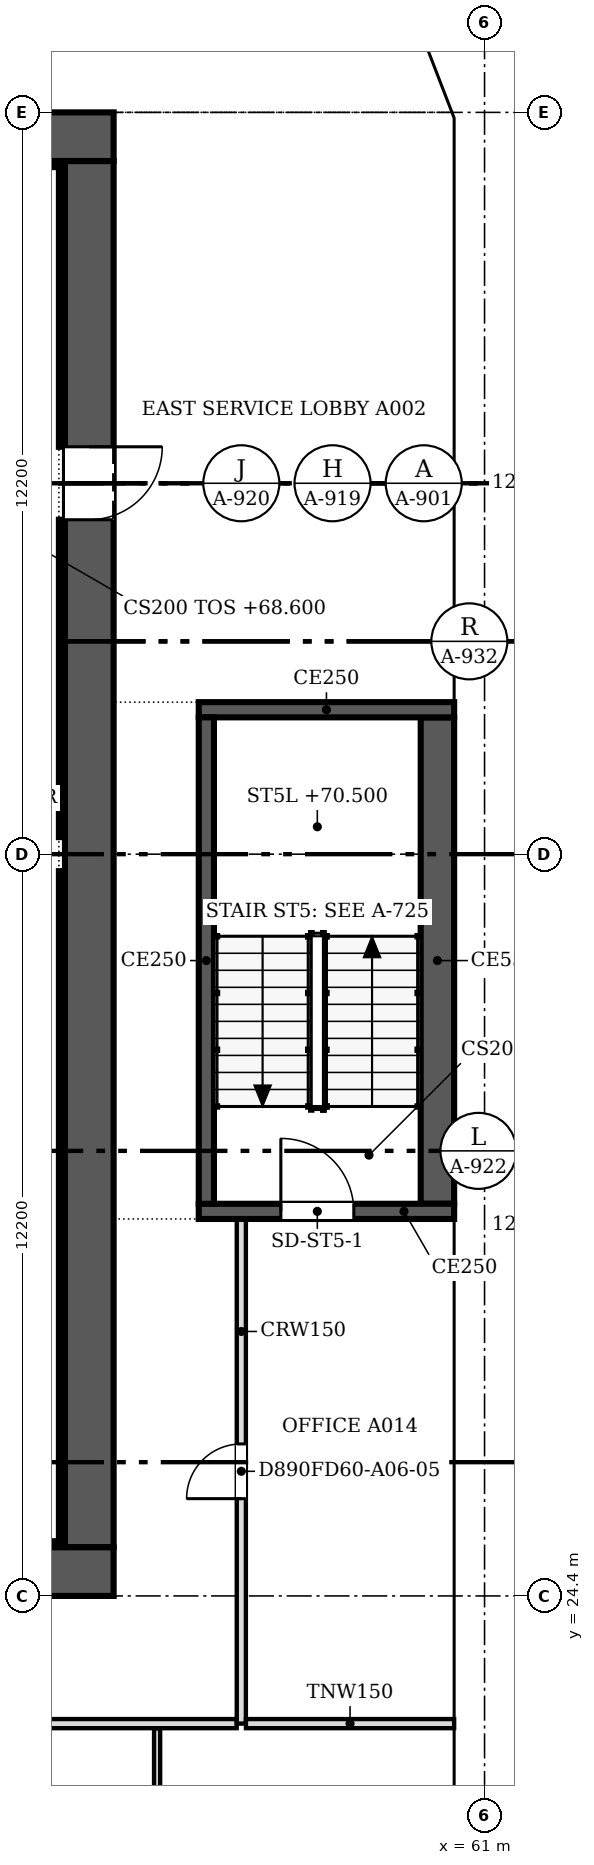
"""IFC4 building model, lengths in metres.
Left out: names, types, materials, properties, quantities, classifications, styles, units other than length and angle.
Written with IfcOpenShell. Run it as: python <this file> out.ifc"""

import sys

from ifc_helpers import new_model, si_unit, direction, frame, frame_2d, origin, place, context, subcontext, project, spatial, polyline, rectangle, outline, extrude, faceted_brep, source, transform, mapped, element, fill, save


model = new_model("IFC4")
c1 = context("Model", 3, precision=1e-05, world=origin(), true_north=direction((0.0, 1.0)))
c2 = subcontext(c1, "Body", "Model", "MODEL_VIEW")
j1 = project(units=[si_unit("LENGTHUNIT", "METRE"), si_unit("PLANEANGLEUNIT", "RADIAN")], contexts=[c1])
p1 = place(None, origin())
s1 = spatial("IfcSite", under=j1, at=p1, CompositionType="ELEMENT")
p2 = place(p1, origin())
s2 = spatial("IfcBuilding", under=s1, at=p2, CompositionType="ELEMENT")
p3 = place(p2, frame((0.0, 0.0, 68.6)))
s3 = spatial("IfcBuildingStorey", under=s2, at=p3, CompositionType="ELEMENT", Elevation=68.6)
m1 = source(origin(), c2, "Body", "Brep", [
    faceted_brep([(6.1, -0.25, 0.0), (3.05, -0.25, 3.8), (0.0, -0.25, 0.0), (6.1, -0.25, 0.0), (0.0, 0.25, 0.0), (3.05, 0.25, 3.8), (6.1, 0.25, 0.0), (6.1, 0.25, 0.0)], [[[0, 1, 2, 3]], [[4, 5, 6, 7]], [[6, 5, 1, 0]], [[5, 4, 2, 1]], [[4, 7, 3, 2]], [[3, 7, 6, 0]]]),
])
p4 = place(p3, frame((60.75, 18.3, 0.0), z_axis=(0.0, 0.0, 1.0), x_axis=(0.0, 1.0, 0.0)))
e1 = element("IfcWall", 1, at=p4, inside=s3, PredefinedType="SOLIDWALL", context=c2, shape_type="MappedRepresentation", body=[
    mapped(m1, transform((0.0, 0.0, 0.0), scale=1.0)),
])
m2 = source(origin(), c2, "Body", "SweptSolid", [
    extrude(outline(polyline([(5.579, 0.25), (3.05, 3.4), (0.521, 0.25), (5.579, 0.25)])), frame((0.0, 0.26, 0.0), z_axis=(0.0, -1.0, 0.0), x_axis=(1.0, 0.0, 0.0)), (0.0, 0.0, 1.0), 0.52),
])
p5 = place(p4, origin())
e2 = element("IfcOpeningElement", 2, at=p5, cuts=e1, PredefinedType="OPENING", context=c2, shape_type="MappedRepresentation", body=[
    mapped(m2, transform((0.0, 0.0, 0.0), scale=1.0)),
])
m3 = source(origin(), c2, "Body", "SweptSolid", [
    extrude(outline(polyline([(6.1, 0.0), (3.05, 3.8), (0.0, 0.0), (6.1, 0.0)])), frame((0.0, 0.25, 0.0), z_axis=(0.0, -1.0, 0.0), x_axis=(1.0, 0.0, 0.0)), (0.0, 0.0, 1.0), 0.5),
])
p6 = place(p3, frame((60.75, 24.4, 0.0), z_axis=(0.0, 0.0, 1.0), x_axis=(0.0, 1.0, 0.0)))
e3 = element("IfcWall", 3, at=p6, inside=s3, PredefinedType="SOLIDWALL", context=c2, shape_type="MappedRepresentation", body=[
    mapped(m3, transform((0.0, 0.0, 0.0), scale=1.0)),
])
p7 = place(p6, origin())
e4 = element("IfcOpeningElement", 4, at=p7, cuts=e3, PredefinedType="OPENING", context=c2, shape_type="MappedRepresentation", body=[
    mapped(m2, transform((0.0, 0.0, 0.0), scale=1.0)),
])
p8 = place(p3, frame((60.75, 30.5, 0.0), z_axis=(0.0, 0.0, 1.0), x_axis=(0.0, 1.0, 0.0)))
e5 = element("IfcWall", 5, at=p8, inside=s3, PredefinedType="SOLIDWALL", context=c2, shape_type="MappedRepresentation", body=[
    mapped(m3, transform((0.0, 0.0, 0.0), scale=1.0)),
])
p9 = place(p8, origin())
e6 = element("IfcOpeningElement", 6, at=p9, cuts=e5, PredefinedType="OPENING", context=c2, shape_type="MappedRepresentation", body=[
    mapped(m2, transform((0.0, 0.0, 0.0), scale=1.0)),
])
p10 = place(p3, frame((60.75, 36.6, 0.0), z_axis=(0.0, 0.0, 1.0), x_axis=(0.0, 1.0, 0.0)))
e7 = element("IfcWall", 7, at=p10, inside=s3, PredefinedType="SOLIDWALL", context=c2, shape_type="MappedRepresentation", body=[
    mapped(m1, transform((0.0, 0.0, 0.0), scale=1.0)),
])
p11 = place(p10, origin())
e8 = element("IfcOpeningElement", 8, at=p11, cuts=e7, PredefinedType="OPENING", context=c2, shape_type="MappedRepresentation", body=[
    mapped(m2, transform((0.0, 0.0, 0.0), scale=1.0)),
])
m4 = source(origin(), c2, "Body", "Brep", [
    faceted_brep([(6.053, -0.25, 0.0), (3.05, -0.25, 3.8), (0.0, -0.25, 0.0), (0.0, 0.25, 0.0), (3.05, 0.25, 3.8), (6.007, 0.25, 0.059), (6.007, 0.25, 0.0), (6.053, 0.0, 0.0)], [[[0, 1, 2]], [[3, 4, 5, 6]], [[5, 4, 1, 0, 7]], [[4, 3, 2, 1]], [[3, 6, 7, 0, 2]], [[7, 6, 5]]]),
])
p12 = place(p3, frame((60.75, 42.7, 0.0), z_axis=(0.0, 0.0, 1.0), x_axis=(0.0, 1.0, 0.0)))
e9 = element("IfcWall", 9, at=p12, inside=s3, PredefinedType="SOLIDWALL", context=c2, shape_type="MappedRepresentation", body=[
    mapped(m4, transform((0.0, 0.0, 0.0), scale=1.0)),
])
m5 = source(origin(), c2, "Body", "SweptSolid", [
    extrude(outline(polyline([(5.537, 0.25), (3.049, 3.399), (0.521, 0.25), (5.537, 0.25)])), frame((0.0, 0.26, 0.0), z_axis=(0.0, -1.0, 0.0), x_axis=(1.0, 0.0, 0.0)), (0.0, 0.0, 1.0), 0.52),
])
p13 = place(p12, origin())
e10 = element("IfcOpeningElement", 10, at=p13, cuts=e9, PredefinedType="OPENING", context=c2, shape_type="MappedRepresentation", body=[
    mapped(m5, transform((0.0, 0.0, 0.0), scale=1.0)),
])
m6 = source(origin(), c2, "Body", "Brep", [
    faceted_brep([(3.003, -0.25, 3.731), (2.95, -0.25, 3.8), (0.0, -0.25, 0.0), (3.003, -0.25, 0.0), (0.047, 0.25, 0.06), (2.898, 0.25, 3.732), (2.898, 0.25, 0.0), (0.047, 0.25, 0.0), (2.95, 0.0, 3.8), (0.0, 0.0, 0.0)], [[[0, 1, 2, 3]], [[4, 5, 6, 7]], [[8, 1, 0]], [[5, 4, 9, 2, 1, 8]], [[7, 6, 3, 2, 9]], [[7, 9, 4]], [[3, 6, 5, 8, 0]]]),
])
p14 = place(p3, frame((60.75, 48.753, 0.0), z_axis=(0.0, 0.0, 1.0), x_axis=(-0.35992665181, 0.932980602862, 0.0)))
e11 = element("IfcWall", 11, at=p14, inside=s3, PredefinedType="SOLIDWALL", context=c2, shape_type="MappedRepresentation", body=[
    mapped(m6, transform((0.0, 0.0, 0.0), scale=1.0)),
])
m7 = source(origin(), c2, "Body", "SweptSolid", [
    extrude(outline(polyline([(2.75, 3.135), (0.511, 0.25), (2.75, 0.25), (2.75, 3.135)])), frame((0.0, 0.26, 0.0), z_axis=(0.0, -1.0, 0.0), x_axis=(1.0, 0.0, 0.0)), (0.0, 0.0, 1.0), 0.52),
])
p15 = place(p14, origin())
e12 = element("IfcOpeningElement", 12, at=p15, cuts=e11, PredefinedType="OPENING", context=c2, shape_type="MappedRepresentation", body=[
    mapped(m7, transform((0.0, 0.0, 0.0), scale=1.0)),
])
p16 = place(p2, frame((0.0, 0.0, 72.4)))
s4 = spatial("IfcBuildingStorey", under=s2, at=p16, CompositionType="ELEMENT", Elevation=72.4)
m8 = source(origin(), c2, "Body", "SweptSolid", [
    extrude(outline(polyline([(3.05, 0.0), (6.1, 3.8), (3.05, 7.6), (0.0, 3.8), (3.05, 0.0)])), frame((0.0, 0.25, 0.0), z_axis=(0.0, -1.0, 0.0), x_axis=(1.0, 0.0, 0.0)), (0.0, 0.0, 1.0), 0.5),
])
p17 = place(p16, frame((60.75, 15.25, -3.8), z_axis=(0.0, 0.0, 1.0), x_axis=(0.0, 1.0, 0.0)))
e13 = element("IfcWall", 13, at=p17, inside=s4, PredefinedType="SOLIDWALL", context=c2, shape_type="MappedRepresentation", body=[
    mapped(m8, transform((0.0, 0.0, 0.0), scale=1.0)),
])
m9 = source(origin(), c2, "Body", "SweptSolid", [
    extrude(outline(polyline([(3.05, 0.399), (5.78, 3.8), (3.05, 7.2), (0.321, 3.8), (3.05, 0.399)])), frame((0.0, 0.26, 0.0), z_axis=(0.0, -1.0, 0.0), x_axis=(1.0, 0.0, 0.0)), (0.0, 0.0, 1.0), 0.52),
])
p18 = place(p17, origin())
e14 = element("IfcOpeningElement", 14, at=p18, cuts=e13, PredefinedType="OPENING", context=c2, shape_type="MappedRepresentation", body=[
    mapped(m9, transform((0.0, 0.0, 0.0), scale=1.0)),
])
m10 = source(origin(), c2, "Body", "Brep", [
    faceted_brep([(3.05, -0.25, 0.0), (6.1, -0.25, 3.8), (6.1, -0.25, 3.8), (3.05, -0.25, 7.6), (0.0, -0.25, 3.8), (0.0, 0.25, 3.8), (3.05, 0.25, 7.6), (6.1, 0.25, 3.8), (6.1, 0.25, 3.8), (3.05, 0.25, 0.0)], [[[0, 1, 2, 3, 4]], [[5, 6, 7, 8, 9]], [[9, 8, 1, 0]], [[7, 6, 3, 2]], [[6, 5, 4, 3]], [[5, 9, 0, 4]], [[1, 8, 7, 2]]]),
])
p19 = place(p16, frame((60.75, 21.35, -3.8), z_axis=(0.0, 0.0, 1.0), x_axis=(0.0, 1.0, 0.0)))
e15 = element("IfcWall", 15, at=p19, inside=s4, PredefinedType="SOLIDWALL", context=c2, shape_type="MappedRepresentation", body=[
    mapped(m10, transform((0.0, 0.0, 0.0), scale=1.0)),
])
p20 = place(p19, origin())
e16 = element("IfcOpeningElement", 16, at=p20, cuts=e15, PredefinedType="OPENING", context=c2, shape_type="MappedRepresentation", body=[
    mapped(m9, transform((0.0, 0.0, 0.0), scale=1.0)),
])
p21 = place(p16, frame((60.75, 27.45, -3.8), z_axis=(0.0, 0.0, 1.0), x_axis=(0.0, 1.0, 0.0)))
e17 = element("IfcWall", 17, at=p21, inside=s4, PredefinedType="SOLIDWALL", context=c2, shape_type="MappedRepresentation", body=[
    mapped(m8, transform((0.0, 0.0, 0.0), scale=1.0)),
])
p22 = place(p21, origin())
e18 = element("IfcOpeningElement", 18, at=p22, cuts=e17, PredefinedType="OPENING", context=c2, shape_type="MappedRepresentation", body=[
    mapped(m9, transform((0.0, 0.0, 0.0), scale=1.0)),
])
p23 = place(p16, frame((60.75, 33.55, -3.8), z_axis=(0.0, 0.0, 1.0), x_axis=(0.0, 1.0, 0.0)))
e19 = element("IfcWall", 19, at=p23, inside=s4, PredefinedType="SOLIDWALL", context=c2, shape_type="MappedRepresentation", body=[
    mapped(m10, transform((0.0, 0.0, 0.0), scale=1.0)),
])
p24 = place(p23, origin())
e20 = element("IfcOpeningElement", 20, at=p24, cuts=e19, PredefinedType="OPENING", context=c2, shape_type="MappedRepresentation", body=[
    mapped(m9, transform((0.0, 0.0, 0.0), scale=1.0)),
])
p25 = place(p16, frame((60.75, 39.65, -3.8), z_axis=(0.0, 0.0, 1.0), x_axis=(0.0, 1.0, 0.0)))
e21 = element("IfcWall", 21, at=p25, inside=s4, PredefinedType="SOLIDWALL", context=c2, shape_type="MappedRepresentation", body=[
    mapped(m8, transform((0.0, 0.0, 0.0), scale=1.0)),
])
p26 = place(p25, origin())
e22 = element("IfcOpeningElement", 22, at=p26, cuts=e21, PredefinedType="OPENING", context=c2, shape_type="MappedRepresentation", body=[
    mapped(m9, transform((0.0, 0.0, 0.0), scale=1.0)),
])
m11 = source(origin(), c2, "Body", "Brep", [
    faceted_brep([(3.003, -0.25, 0.0), (3.05, -0.25, 0.06), (3.05, -0.25, 7.54), (3.003, -0.25, 7.6), (0.0, -0.25, 3.8), (0.0, 0.25, 3.8), (2.957, 0.25, 7.541), (2.957, 0.25, 0.059), (3.003, 0.0, 0.0), (3.003, 0.0, 7.6)], [[[0, 1, 2, 3, 4]], [[5, 6, 7]], [[1, 0, 8]], [[9, 3, 2]], [[6, 5, 4, 3, 9]], [[5, 7, 8, 0, 4]], [[1, 8, 7, 6, 9, 2]]]),
])
p27 = place(p16, frame((60.75, 45.75, -3.8), z_axis=(0.0, 0.0, 1.0), x_axis=(0.0, 1.0, 0.0)))
e23 = element("IfcWall", 23, at=p27, inside=s4, PredefinedType="SOLIDWALL", context=c2, shape_type="MappedRepresentation", body=[
    mapped(m11, transform((0.0, 0.0, 0.0), scale=1.0)),
])
m12 = source(origin(), c2, "Body", "SweptSolid", [
    extrude(outline(polyline([(2.803, 6.944), (0.319, 3.8), (2.803, 0.656), (2.803, 6.944)])), frame((0.0, 0.26, 0.0), z_axis=(0.0, -1.0, 0.0), x_axis=(1.0, 0.0, 0.0)), (0.0, 0.0, 1.0), 0.52),
])
p28 = place(p27, origin())
e24 = element("IfcOpeningElement", 24, at=p28, cuts=e23, PredefinedType="OPENING", context=c2, shape_type="MappedRepresentation", body=[
    mapped(m12, transform((0.0, 0.0, 0.0), scale=1.0)),
])
m13 = source(origin(), c2, "Body", "Brep", [
    faceted_brep([(0.047, -0.25, 0.0), (2.997, -0.25, 3.8), (0.047, -0.25, 7.6), (0.0, -0.25, 7.541), (0.0, -0.25, 0.059), (0.093, 0.25, 7.54), (2.944, 0.25, 3.868), (2.944, 0.25, 3.732), (0.093, 0.25, 0.06), (2.997, 0.0, 3.8), (0.047, 0.0, 0.0), (0.047, 0.0, 7.6)], [[[0, 1, 2, 3, 4]], [[5, 6, 7, 8]], [[8, 7, 9, 1, 0, 10]], [[6, 5, 11, 2, 1, 9]], [[3, 2, 11]], [[10, 0, 4]], [[8, 10, 4, 3, 11, 5]], [[9, 7, 6]]]),
])
p29 = place(p16, frame((60.767, 48.71, -3.8), z_axis=(0.0, 0.0, 1.0), x_axis=(-0.359901446078, 0.932990326376, 0.0)))
e25 = element("IfcWall", 25, at=p29, inside=s4, PredefinedType="SOLIDWALL", context=c2, shape_type="MappedRepresentation", body=[
    mapped(m13, transform((0.0, 0.0, 0.0), scale=1.0)),
])
m14 = source(origin(), c2, "Body", "SweptSolid", [
    extrude(outline(polyline([(0.247, 0.665), (2.681, 3.8), (0.247, 6.935), (0.247, 0.665)])), frame((0.0, 0.26, 0.0), z_axis=(0.0, -1.0, 0.0), x_axis=(1.0, 0.0, 0.0)), (0.0, 0.0, 1.0), 0.52),
])
p30 = place(p29, origin())
e26 = element("IfcOpeningElement", 26, at=p30, cuts=e25, PredefinedType="OPENING", context=c2, shape_type="MappedRepresentation", body=[
    mapped(m14, transform((0.0, 0.0, 0.0), scale=1.0)),
])
p31 = place(p3, frame((54.9, 24.8, 0.0), z_axis=(0.0, 0.0, 1.0), x_axis=(-1.0, 0.0, 0.0)))
e27 = element("IfcWall", 27, at=p31, inside=s3, PredefinedType="SHEAR", context=c2, shape_type="SweptSolid", body=[
    extrude(rectangle(XDim=24.4, YDim=0.8, at=frame_2d((12.2, 0.0))), origin(), (0.0, 0.0, 1.0), 3.8),
])
m15 = source(origin(), c2, "Body", "SweptSolid", [
    extrude(rectangle(XDim=1.2, YDim=2.1, at=frame_2d((0.6, 1.05))), frame((0.0, 0.41, 0.0), z_axis=(0.0, -1.0, 0.0), x_axis=(1.0, 0.0, 0.0)), (0.0, 0.0, 1.0), 0.82),
])
p32 = place(p31, frame((1.5, 0.0, 0.0)))
e28 = element("IfcOpeningElement", 28, at=p32, cuts=e27, PredefinedType="OPENING", context=c2, shape_type="MappedRepresentation", body=[
    mapped(m15, transform((0.0, 0.0, 0.0), scale=1.0)),
])
p33 = place(p3, frame((30.5, 48.4, 0.0), z_axis=(0.0, 0.0, 1.0), x_axis=(1.0, 0.0, 0.0)))
e29 = element("IfcWall", 29, at=p33, inside=s3, PredefinedType="SHEAR", context=c2, shape_type="SweptSolid", body=[
    extrude(rectangle(XDim=24.4, YDim=0.8, at=frame_2d((12.2, 0.0))), origin(), (0.0, 0.0, 1.0), 3.8),
])
p34 = place(p3, frame((54.5, 48.0, 0.0), z_axis=(0.0, 0.0, 1.0), x_axis=(0.0, -1.0, 0.0)))
e30 = element("IfcWall", 30, at=p34, inside=s3, PredefinedType="SHEAR", context=c2, shape_type="SweptSolid", body=[
    extrude(rectangle(XDim=22.8, YDim=0.8, at=frame_2d((11.4, 0.0))), origin(), (0.0, 0.0, 1.0), 3.8),
])
p35 = place(p34, frame((4.7, 0.0, 0.0)))
e31 = element("IfcOpeningElement", 31, at=p35, cuts=e30, PredefinedType="OPENING", context=c2, shape_type="MappedRepresentation", body=[
    mapped(m15, transform((0.0, 0.0, 0.0), scale=1.0)),
])
p36 = place(p3, frame((53.4, 25.25, 0.0), z_axis=(0.0, 0.0, 1.0), x_axis=(1.0, 0.0, 0.0)))
e32 = element("IfcWall", 32, at=p36, inside=s3, PredefinedType="SOLIDWALL", context=c2, shape_type="SweptSolid", body=[
    extrude(rectangle(XDim=0.7, YDim=0.1, at=frame_2d((0.35, 0.0))), origin(), (0.0, 0.0, 1.0), 3.8),
])
p37 = place(p3, frame((31.3, 47.95, 0.0), z_axis=(0.0, 0.0, 1.0), x_axis=(1.0, 0.0, 0.0)))
e33 = element("IfcWall", 33, at=p37, inside=s3, PredefinedType="SOLIDWALL", context=c2, shape_type="SweptSolid", body=[
    extrude(rectangle(XDim=22.8, YDim=0.1, at=frame_2d((11.4, 0.0))), origin(), (0.0, 0.0, 1.0), 3.8),
])
p38 = place(p3, frame((54.05, 25.3, 0.0), z_axis=(0.0, 0.0, 1.0), x_axis=(0.0, 1.0, 0.0)))
e34 = element("IfcWall", 34, at=p38, inside=s3, PredefinedType="SOLIDWALL", context=c2, shape_type="SweptSolid", body=[
    extrude(rectangle(XDim=11.02, YDim=0.1, at=frame_2d((5.51, 0.0))), origin(), (0.0, 0.0, 1.0), 3.8),
])
p39 = place(p3, frame((54.05, 36.88, 0.0), z_axis=(0.0, 0.0, 1.0), x_axis=(0.0, 1.0, 0.0)))
e35 = element("IfcWall", 35, at=p39, inside=s3, PredefinedType="SOLIDWALL", context=c2, shape_type="SweptSolid", body=[
    extrude(rectangle(XDim=5.22, YDim=0.1, at=frame_2d((2.61, 0.0))), origin(), (0.0, 0.0, 1.0), 3.8),
])
p40 = place(p3, frame((54.05, 43.3, 0.0), z_axis=(0.0, 0.0, 1.0), x_axis=(0.0, 1.0, 0.0)))
e36 = element("IfcWall", 36, at=p40, inside=s3, PredefinedType="SOLIDWALL", context=c2, shape_type="SweptSolid", body=[
    extrude(rectangle(XDim=4.6, YDim=0.1, at=frame_2d((2.3, 0.0))), origin(), (0.0, 0.0, 1.0), 3.8),
])
p41 = place(p3, frame((60.5, 30.725, 0.0), z_axis=(0.0, 0.0, 1.0), x_axis=(-1.0, 0.0, 0.0)))
e37 = element("IfcWall", 37, at=p41, inside=s3, PredefinedType="SOLIDWALL", context=c2, shape_type="SweptSolid", body=[
    extrude(rectangle(XDim=4.2, YDim=0.25, at=frame_2d((2.1, 0.0))), origin(), (0.0, 0.0, 1.0), 3.8),
])
m16 = source(origin(), c2, "Body", "SweptSolid", [
    extrude(rectangle(XDim=1.2, YDim=2.1, at=frame_2d((0.6, 1.05))), frame((0.0, 0.135, 0.0), z_axis=(0.0, -1.0, 0.0), x_axis=(1.0, 0.0, 0.0)), (0.0, 0.0, 1.0), 0.27),
])
p42 = place(p41, frame((1.65, 0.0, 0.0)))
e38 = element("IfcOpeningElement", 38, at=p42, cuts=e37, PredefinedType="OPENING", context=c2, shape_type="MappedRepresentation", body=[
    mapped(m16, transform((0.0, 0.0, 0.0), scale=1.0)),
])
p43 = place(p3, frame((56.425, 30.85, 0.0), z_axis=(0.0, 0.0, 1.0), x_axis=(0.0, 1.0, 0.0)))
e39 = element("IfcWall", 39, at=p43, inside=s3, PredefinedType="SOLIDWALL", context=c2, shape_type="SweptSolid", body=[
    extrude(rectangle(XDim=8.0, YDim=0.25, at=frame_2d((4.0, 0.0))), origin(), (0.0, 0.0, 1.0), 3.8),
])
p44 = place(p3, frame((56.3, 38.975, 0.0), z_axis=(0.0, 0.0, 1.0), x_axis=(1.0, 0.0, 0.0)))
e40 = element("IfcWall", 40, at=p44, inside=s3, PredefinedType="SOLIDWALL", context=c2, shape_type="SweptSolid", body=[
    extrude(rectangle(XDim=4.2, YDim=0.25, at=frame_2d((2.1, 0.0))), origin(), (0.0, 0.0, 1.0), 3.8),
])
p45 = place(p3, frame((60.225, 38.85, 0.0), z_axis=(0.0, 0.0, 1.0), x_axis=(0.0, -1.0, 0.0)))
e41 = element("IfcWall", 41, at=p45, inside=s3, PredefinedType="SOLIDWALL", context=c2, shape_type="SweptSolid", body=[
    extrude(rectangle(XDim=8.0, YDim=0.55, at=frame_2d((4.0, 0.0))), origin(), (0.0, 0.0, 1.0), 3.8),
])
p46 = place(p3, frame((55.615, 22.224, 0.0), z_axis=(0.0, 0.0, 1.0), x_axis=(0.0, -1.0, 0.0)))
e42 = element("IfcWall", 42, at=p46, inside=s3, PredefinedType="PARTITIONING", context=c2, shape_type="SweptSolid", body=[
    extrude(rectangle(XDim=5.048, YDim=0.1, at=frame_2d((2.524, 0.0))), origin(), (0.0, 0.0, 1.0), 3.067),
])
m17 = source(origin(), c2, "Body", "SweptSolid", [
    extrude(rectangle(XDim=0.9, YDim=2.1, at=frame_2d((0.45, 1.05))), frame((0.0, 0.06, 0.0), z_axis=(0.0, -1.0, 0.0), x_axis=(1.0, 0.0, 0.0)), (0.0, 0.0, 1.0), 0.12),
])
p47 = place(p46, frame((2.048, 0.0, 0.0)))
e43 = element("IfcOpeningElement", 43, at=p47, cuts=e42, PredefinedType="OPENING", context=c2, shape_type="MappedRepresentation", body=[
    mapped(m17, transform((0.0, 0.0, 0.0), scale=1.0)),
])
p48 = place(p3, frame((47.4, 22.3, 0.0), z_axis=(0.0, 0.0, 1.0), x_axis=(1.0, 0.0, 0.0)))
e44 = element("IfcWall", 44, at=p48, inside=s3, PredefinedType="PARTITIONING", context=c2, shape_type="SweptSolid", body=[
    extrude(rectangle(XDim=9.524, YDim=0.15, at=frame_2d((4.762, 0.0))), origin(), (0.0, 0.0, 1.0), 3.067),
])
p49 = place(p3, frame((57.0, 30.6, 0.0), z_axis=(0.0, 0.0, 1.0), x_axis=(0.0, -1.0, 0.0)))
e45 = element("IfcWall", 45, at=p49, inside=s3, PredefinedType="PARTITIONING", context=c2, shape_type="SweptSolid", body=[
    extrude(rectangle(XDim=8.3, YDim=0.15, at=frame_2d((4.15, 0.0))), origin(), (0.0, 0.0, 1.0), 3.067),
])
m18 = source(origin(), c2, "Body", "SweptSolid", [
    extrude(rectangle(XDim=0.9, YDim=2.1, at=frame_2d((0.45, 1.05))), frame((0.0, 0.085, 0.0), z_axis=(0.0, -1.0, 0.0), x_axis=(1.0, 0.0, 0.0)), (0.0, 0.0, 1.0), 0.17),
])
p50 = place(p49, frame((3.7, 0.0, 0.0)))
e46 = element("IfcOpeningElement", 46, at=p50, cuts=e45, PredefinedType="OPENING", context=c2, shape_type="MappedRepresentation", body=[
    mapped(m18, transform((0.0, 0.0, 0.0), scale=1.0)),
])
p51 = place(p3, frame((57.076, 22.3, 0.0), z_axis=(0.0, 0.0, 1.0), x_axis=(1.0, 0.0, 0.0)))
e47 = element("IfcWall", 47, at=p51, inside=s3, PredefinedType="PARTITIONING", context=c2, shape_type="SweptSolid", body=[
    extrude(rectangle(XDim=3.424, YDim=0.15, at=frame_2d((1.712, 0.0))), origin(), (0.0, 0.0, 1.0), 3.067),
])
m19 = source(origin(), c2, "Body", "SweptSolid", [
    extrude(rectangle(XDim=1.2, YDim=2.1, at=frame_2d((0.6, 1.05))), frame((0.0, 0.025, 0.0), z_axis=(0.0, -1.0, 0.0), x_axis=(1.0, 0.0, 0.0)), (0.0, 0.0, 1.0), 0.05),
])
p52 = place(p35, origin())
e48 = element("IfcDoor", 48, at=p52, inside=s3, OperationType="SINGLE_SWING_LEFT", PredefinedType="DOOR", context=c2, shape_type="MappedRepresentation", body=[
    mapped(m19, transform((0.0, 0.0, 0.0), scale=1.0)),
])
fill(e31, e48)
p53 = place(p42, origin())
e49 = element("IfcDoor", 49, at=p53, inside=s3, OperationType="SINGLE_SWING_RIGHT", PredefinedType="DOOR", context=c2, shape_type="MappedRepresentation", body=[
    mapped(m19, transform((0.0, 0.0, 0.0), scale=1.0)),
])
fill(e38, e49)
m20 = source(origin(), c2, "Body", "SweptSolid", [
    extrude(rectangle(XDim=0.9, YDim=2.1, at=frame_2d((0.45, 1.05))), frame((0.0, 0.025, 0.0), z_axis=(0.0, -1.0, 0.0), x_axis=(1.0, 0.0, 0.0)), (0.0, 0.0, 1.0), 0.05),
])
p54 = place(p50, origin())
e50 = element("IfcDoor", 50, at=p54, inside=s3, OperationType="SINGLE_SWING_RIGHT", PredefinedType="DOOR", context=c2, shape_type="MappedRepresentation", body=[
    mapped(m20, transform((0.0, 0.0, 0.0), scale=1.0)),
])
fill(e46, e50)
save(model, sys.argv[1])
